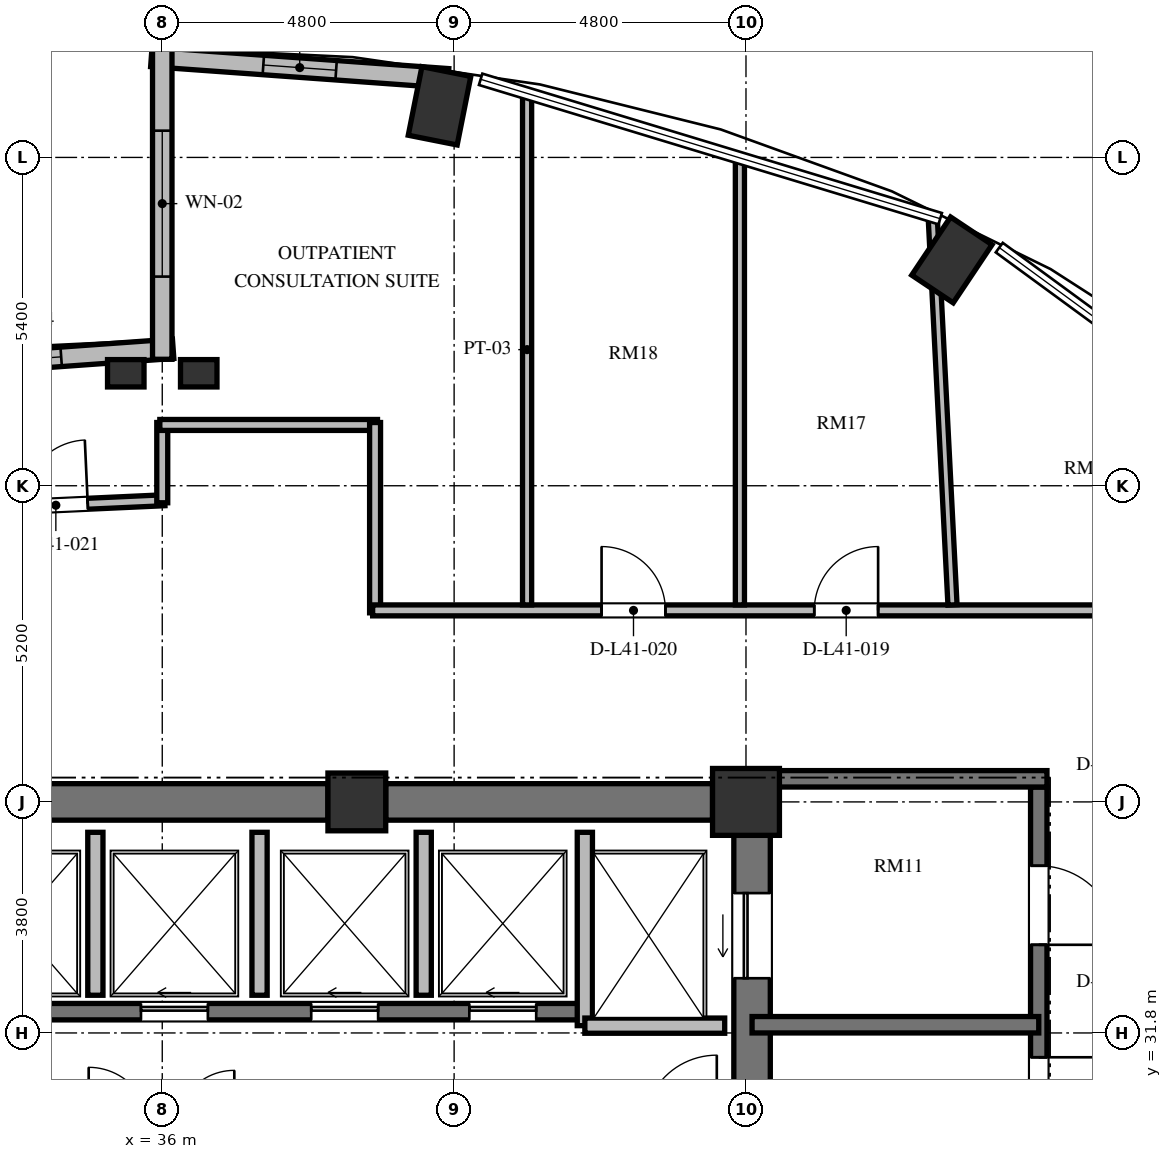
"""IFC4 building model, lengths in metres.
Left out: names, types, materials, properties, quantities, classifications, styles, units other than length and angle.
Written with IfcOpenShell. Run it as: python <this file> out.ifc"""

import sys

from ifc_helpers import new_model, si_unit, direction, frame, frame_2d, origin, origin_2d, place, context, subcontext, project, spatial, rectangle, extrude, element, fill, save


model = new_model("IFC4")
c1 = context("Model", 3, precision=1e-05, world=origin(), true_north=direction((0.0, 1.0)))
c2 = subcontext(c1, "Body", "Model", "MODEL_VIEW")
j1 = project(units=[si_unit("LENGTHUNIT", "METRE"), si_unit("PLANEANGLEUNIT", "RADIAN")], contexts=[c1])
p1 = place(None, origin())
s1 = spatial("IfcSite", under=j1, at=p1, CompositionType="ELEMENT")
p2 = place(p1, origin())
s2 = spatial("IfcBuilding", under=s1, at=p2, CompositionType="ELEMENT")
p3 = place(p2, frame((0.0, 0.0, 160.176)))
s3 = spatial("IfcBuildingStorey", under=s2, at=p3, CompositionType="ELEMENT", Elevation=160.176)
for number, where, z_axis, x_axis in (
    (1, (48.987, 44.514, 0.0), (0.0, 0.0, 1.0), (0.556, 0.831, 0.0)),
    (2, (40.56, 47.049, 0.0), (0.0, 0.0, 1.0), (0.195, 0.981, 0.0)),
):
    element("IfcColumn", number, at=place(p3, frame(where, z_axis=z_axis, x_axis=x_axis)), inside=s3, PredefinedType="COLUMN", context=c2, shape_type="SweptSolid", body=[
        extrude(rectangle(XDim=1.15, YDim=0.82, at=origin_2d()), origin(), (0.0, 0.0, 1.0), 3.648),
    ])
p4 = place(p3, frame((45.6, 35.6, 0.0), z_axis=(0.0, 0.0, 1.0), x_axis=(1.0, 0.0, 0.0)))
e3 = element("IfcColumn", 3, at=p4, inside=s3, PredefinedType="COLUMN", context=c2, shape_type="SweptSolid", body=[
    extrude(rectangle(XDim=1.1, YDim=1.1, at=origin_2d()), origin(), (0.0, 0.0, 1.0), 3.648),
])
p5 = place(p3, frame((39.2, 35.6, 0.0), z_axis=(0.0, 0.0, 1.0), x_axis=(1.0, 0.0, 0.0)))
e4 = element("IfcColumn", 4, at=p5, inside=s3, PredefinedType="COLUMN", context=c2, shape_type="SweptSolid", body=[
    extrude(rectangle(XDim=0.95, YDim=0.95, at=origin_2d()), origin(), (0.0, 0.0, 1.0), 3.648),
])
for number, where, z_axis, x_axis in (
    (5, (35.4, 42.65, 0.0), (0.0, 0.0, 1.0), (1.0, 0.0, 0.0)),
    (6, (36.6, 42.65, 0.0), (0.0, 0.0, 1.0), (1.0, 0.0, 0.0)),
):
    element("IfcColumn", number, at=place(p3, frame(where, z_axis=z_axis, x_axis=x_axis)), inside=s3, PredefinedType="PILASTER", context=c2, shape_type="SweptSolid", body=[
        extrude(rectangle(XDim=0.6, YDim=0.45, at=origin_2d()), origin(), (0.0, 0.0, 1.0), 3.648),
    ])
p6 = place(p3, frame((45.7, 20.95, 0.0), z_axis=(0.0, 0.0, 1.0), x_axis=(0.0, 1.0, 0.0)))
e7 = element("IfcWall", 7, at=p6, inside=s3, PredefinedType="SHEAR", context=c2, shape_type="SweptSolid", body=[
    extrude(rectangle(XDim=14.1, YDim=0.6, at=frame_2d((7.05, 0.0))), origin(), (0.0, 0.0, 1.0), 3.648),
])
p7 = place(p6, frame((11.75, 0.0, 0.0)))
e8 = element("IfcOpeningElement", 8, at=p7, cuts=e7, PredefinedType="OPENING", context=c2, shape_type="SweptSolid", body=[
    extrude(rectangle(XDim=1.4, YDim=2.3, at=frame_2d((0.7, 1.15))), frame((0.0, 0.31, 0.0), z_axis=(0.0, -1.0, 0.0), x_axis=(1.0, 0.0, 0.0)), (0.0, 0.0, 1.0), 0.62),
])
p8 = place(p6, frame((0.95, 0.0, 0.0)))
e9 = element("IfcOpeningElement", 9, at=p8, cuts=e7, PredefinedType="OPENING", context=c2, shape_type="SweptSolid", body=[
    extrude(rectangle(XDim=1.4, YDim=2.3, at=frame_2d((0.7, 1.15))), frame((0.0, 0.31, 0.0), z_axis=(0.0, -1.0, 0.0), x_axis=(1.0, 0.0, 0.0)), (0.0, 0.0, 1.0), 0.62),
])
p9 = place(p3, frame((33.275, 35.6, 0.0), z_axis=(0.0, 0.0, 1.0), x_axis=(1.0, 0.0, 0.0)))
e10 = element("IfcWall", 10, at=p9, inside=s3, PredefinedType="SHEAR", context=c2, shape_type="SweptSolid", body=[
    extrude(rectangle(XDim=5.45, YDim=0.6, at=frame_2d((2.725, 0.0))), origin(), (0.0, 0.0, 1.0), 3.648),
])
p10 = place(p3, frame((39.675, 35.6, 0.0), z_axis=(0.0, 0.0, 1.0), x_axis=(1.0, 0.0, 0.0)))
e11 = element("IfcWall", 11, at=p10, inside=s3, PredefinedType="SHEAR", context=c2, shape_type="SweptSolid", body=[
    extrude(rectangle(XDim=5.375, YDim=0.6, at=frame_2d((2.688, 0.0))), origin(), (0.0, 0.0, 1.0), 3.648),
])
p11 = place(p3, frame((40.701, 47.501, 0.0), z_axis=(0.0, 0.0, 1.0), x_axis=(-0.997415460462, 0.071849838072, 0.0)))
e12 = element("IfcWall", 12, at=p11, inside=s3, PredefinedType="SOLIDWALL", context=c2, shape_type="SweptSolid", body=[
    extrude(rectangle(XDim=4.893, YDim=0.32, at=frame_2d((2.447, 0.0))), origin(), (0.0, 0.0, 1.0), 3.428),
])
p12 = place(p11, frame((1.846, 0.0, 0.85)))
e13 = element("IfcOpeningElement", 13, at=p12, cuts=e12, PredefinedType="OPENING", context=c2, shape_type="SweptSolid", body=[
    extrude(rectangle(XDim=1.2, YDim=2.2, at=frame_2d((0.6, 1.1))), frame((0.0, 0.17, 0.0), z_axis=(0.0, -1.0, 0.0), x_axis=(1.0, 0.0, 0.0)), (0.0, 0.0, 1.0), 0.34),
])
p13 = place(p3, frame((36.179, 43.053, 0.0), z_axis=(0.0, 0.0, 1.0), x_axis=(-0.997415202861, -0.071853413984, 0.0)))
e14 = element("IfcWall", 14, at=p13, inside=s3, PredefinedType="SOLIDWALL", context=c2, shape_type="SweptSolid", body=[
    extrude(rectangle(XDim=4.893, YDim=0.32, at=frame_2d((2.446, 0.0))), origin(), (0.0, 0.0, 1.0), 3.428),
])
p14 = place(p13, frame((1.846, 0.0, 0.85)))
e15 = element("IfcOpeningElement", 15, at=p14, cuts=e14, PredefinedType="OPENING", context=c2, shape_type="SweptSolid", body=[
    extrude(rectangle(XDim=1.2, YDim=1.8, at=frame_2d((0.6, 0.9))), frame((0.0, 0.17, 0.0), z_axis=(0.0, -1.0, 0.0), x_axis=(1.0, 0.0, 0.0)), (0.0, 0.0, 1.0), 0.34),
])
p15 = place(p3, frame((36.0, 48.0, 0.0), z_axis=(0.0, 0.0, 1.0), x_axis=(0.0, -1.0, 0.0)))
e16 = element("IfcWall", 16, at=p15, inside=s3, PredefinedType="SOLIDWALL", context=c2, shape_type="SweptSolid", body=[
    extrude(rectangle(XDim=5.12, YDim=0.32, at=frame_2d((2.56, 0.0))), origin(), (0.0, 0.0, 1.0), 3.428),
])
p16 = place(p15, frame((1.36, 0.0, 0.84)))
e17 = element("IfcOpeningElement", 17, at=p16, cuts=e16, PredefinedType="OPENING", context=c2, shape_type="SweptSolid", body=[
    extrude(rectangle(XDim=2.4, YDim=2.04, at=frame_2d((1.2, 1.02))), frame((0.0, 0.17, 0.0), z_axis=(0.0, -1.0, 0.0), x_axis=(1.0, 0.0, 0.0)), (0.0, 0.0, 1.0), 0.34),
])
p17 = place(p3, frame((26.55, 32.15, 0.0), z_axis=(0.0, 0.0, 1.0), x_axis=(1.0, 0.0, 0.0)))
e18 = element("IfcWall", 18, at=p17, inside=s3, PredefinedType="SHEAR", context=c2, shape_type="SweptSolid", body=[
    extrude(rectangle(XDim=16.4, YDim=0.27, at=frame_2d((8.2, 0.0))), origin(), (0.0, 0.0, 1.0), 3.648),
])
p18 = place(p17, frame((1.525, 0.0, 0.0)))
e19 = element("IfcOpeningElement", 19, at=p18, cuts=e18, PredefinedType="OPENING", context=c2, shape_type="SweptSolid", body=[
    extrude(rectangle(XDim=1.05, YDim=2.15, at=frame_2d((0.525, 1.075))), frame((0.0, 0.145, 0.0), z_axis=(0.0, -1.0, 0.0), x_axis=(1.0, 0.0, 0.0)), (0.0, 0.0, 1.0), 0.29),
])
p19 = place(p17, frame((4.275, 0.0, 0.0)))
e20 = element("IfcOpeningElement", 20, at=p19, cuts=e18, PredefinedType="OPENING", context=c2, shape_type="SweptSolid", body=[
    extrude(rectangle(XDim=0.95, YDim=2.1, at=frame_2d((0.475, 1.05))), frame((0.0, 0.145, 0.0), z_axis=(0.0, -1.0, 0.0), x_axis=(1.0, 0.0, 0.0)), (0.0, 0.0, 1.0), 0.29),
])
p20 = place(p17, frame((6.5, 0.0, 0.0)))
e21 = element("IfcOpeningElement", 21, at=p20, cuts=e18, PredefinedType="OPENING", context=c2, shape_type="SweptSolid", body=[
    extrude(rectangle(XDim=1.1, YDim=2.2, at=frame_2d((0.55, 1.1))), frame((0.0, 0.145, 0.0), z_axis=(0.0, -1.0, 0.0), x_axis=(1.0, 0.0, 0.0)), (0.0, 0.0, 1.0), 0.29),
])
p21 = place(p17, frame((9.1, 0.0, 0.0)))
e22 = element("IfcOpeningElement", 22, at=p21, cuts=e18, PredefinedType="OPENING", context=c2, shape_type="SweptSolid", body=[
    extrude(rectangle(XDim=1.1, YDim=2.2, at=frame_2d((0.55, 1.1))), frame((0.0, 0.145, 0.0), z_axis=(0.0, -1.0, 0.0), x_axis=(1.0, 0.0, 0.0)), (0.0, 0.0, 1.0), 0.29),
])
p22 = place(p17, frame((11.9, 0.0, 0.0)))
e23 = element("IfcOpeningElement", 23, at=p22, cuts=e18, PredefinedType="OPENING", context=c2, shape_type="SweptSolid", body=[
    extrude(rectangle(XDim=1.1, YDim=2.2, at=frame_2d((0.55, 1.1))), frame((0.0, 0.145, 0.0), z_axis=(0.0, -1.0, 0.0), x_axis=(1.0, 0.0, 0.0)), (0.0, 0.0, 1.0), 0.29),
])
p23 = place(p17, frame((14.5, 0.0, 0.0)))
e24 = element("IfcOpeningElement", 24, at=p23, cuts=e18, PredefinedType="OPENING", context=c2, shape_type="SweptSolid", body=[
    extrude(rectangle(XDim=1.1, YDim=2.2, at=frame_2d((0.55, 1.1))), frame((0.0, 0.145, 0.0), z_axis=(0.0, -1.0, 0.0), x_axis=(1.0, 0.0, 0.0)), (0.0, 0.0, 1.0), 0.29),
])
p24 = place(p3, frame((42.95, 31.92, 0.0), z_axis=(0.0, 0.0, 1.0), x_axis=(0.0, 1.0, 0.0)))
e25 = element("IfcWall", 25, at=p24, inside=s3, PredefinedType="SOLIDWALL", context=c2, shape_type="SweptSolid", body=[
    extrude(rectangle(XDim=3.18, YDim=0.25, at=frame_2d((1.59, 0.0))), origin(), (0.0, 0.0, 1.0), 3.428),
])
p25 = place(p3, frame((42.95, 31.92, 0.0), z_axis=(0.0, 0.0, 1.0), x_axis=(1.0, 0.0, 0.0)))
e26 = element("IfcWall", 26, at=p25, inside=s3, PredefinedType="SOLIDWALL", context=c2, shape_type="SweptSolid", body=[
    extrude(rectangle(XDim=2.3, YDim=0.25, at=frame_2d((1.15, 0.0))), origin(), (0.0, 0.0, 1.0), 3.428),
])
for number, where, z_axis, x_axis in (
    (27, (34.9, 32.42, 0.0), (0.0, 0.0, 1.0), (0.0, 1.0, 0.0)),
    (28, (37.6, 32.42, 0.0), (0.0, 0.0, 1.0), (0.0, 1.0, 0.0)),
    (29, (40.3, 32.42, 0.0), (0.0, 0.0, 1.0), (0.0, 1.0, 0.0)),
):
    element("IfcWall", number, at=place(p3, frame(where, z_axis=z_axis, x_axis=x_axis)), inside=s3, PredefinedType="SOLIDWALL", context=c2, shape_type="SweptSolid", body=[
        extrude(rectangle(XDim=2.68, YDim=0.25, at=frame_2d((1.34, 0.0))), origin(), (0.0, 0.0, 1.0), 3.428),
    ])
p26 = place(p3, frame((50.415, 35.845, 0.0), z_axis=(0.0, 0.0, 1.0), x_axis=(0.0, -1.0, 0.0)))
e30 = element("IfcWall", 30, at=p26, inside=s3, PredefinedType="SHEAR", context=c2, shape_type="SweptSolid", body=[
    extrude(rectangle(XDim=15.825, YDim=0.27, at=frame_2d((7.913, 0.0))), origin(), (0.0, 0.0, 1.0), 3.648),
])
p27 = place(p26, frame((4.445, 0.0, 0.0)))
e31 = element("IfcOpeningElement", 31, at=p27, cuts=e30, PredefinedType="OPENING", context=c2, shape_type="SweptSolid", body=[
    extrude(rectangle(XDim=1.2, YDim=2.15, at=frame_2d((0.6, 1.075))), frame((0.0, 0.145, 0.0), z_axis=(0.0, -1.0, 0.0), x_axis=(1.0, 0.0, 0.0)), (0.0, 0.0, 1.0), 0.29),
])
p28 = place(p26, frame((1.295, 0.0, 0.0)))
e32 = element("IfcOpeningElement", 32, at=p28, cuts=e30, PredefinedType="OPENING", context=c2, shape_type="SweptSolid", body=[
    extrude(rectangle(XDim=1.3, YDim=2.2, at=frame_2d((0.65, 1.1))), frame((0.0, 0.145, 0.0), z_axis=(0.0, -1.0, 0.0), x_axis=(1.0, 0.0, 0.0)), (0.0, 0.0, 1.0), 0.29),
])
p29 = place(p26, frame((13.095, 0.0, 0.0)))
e33 = element("IfcOpeningElement", 33, at=p29, cuts=e30, PredefinedType="OPENING", context=c2, shape_type="SweptSolid", body=[
    extrude(rectangle(XDim=1.3, YDim=2.2, at=frame_2d((0.65, 1.1))), frame((0.0, 0.145, 0.0), z_axis=(0.0, -1.0, 0.0), x_axis=(1.0, 0.0, 0.0)), (0.0, 0.0, 1.0), 0.29),
])
p30 = place(p3, frame((46.0, 35.98, 0.0), z_axis=(0.0, 0.0, 1.0), x_axis=(1.0, 0.0, 0.0)))
e34 = element("IfcWall", 34, at=p30, inside=s3, PredefinedType="SHEAR", context=c2, shape_type="SweptSolid", body=[
    extrude(rectangle(XDim=4.55, YDim=0.27, at=frame_2d((2.275, 0.0))), origin(), (0.0, 0.0, 1.0), 3.648),
])
p31 = place(p3, frame((45.7, 31.935, 0.0), z_axis=(0.0, 0.0, 1.0), x_axis=(1.0, 0.0, 0.0)))
e35 = element("IfcWall", 35, at=p31, inside=s3, PredefinedType="SHEAR", context=c2, shape_type="SweptSolid", body=[
    extrude(rectangle(XDim=4.715, YDim=0.27, at=frame_2d((2.357, 0.0))), origin(), (0.0, 0.0, 1.0), 3.648),
])
p32 = place(p3, frame((32.46, 40.397, 0.0), z_axis=(0.0, 0.0, 1.0), x_axis=(0.998948498694, 0.045846449783, 0.0)))
e36 = element("IfcWall", 36, at=p32, inside=s3, PredefinedType="PARTITIONING", context=c2, shape_type="SweptSolid", body=[
    extrude(rectangle(XDim=3.584, YDim=0.18, at=frame_2d((1.792, 0.0))), origin(), (0.0, 0.0, 1.0), 3.428),
])
p33 = place(p32, frame((1.267, 0.0, 0.0)))
e37 = element("IfcOpeningElement", 37, at=p33, cuts=e36, PredefinedType="OPENING", context=c2, shape_type="SweptSolid", body=[
    extrude(rectangle(XDim=1.05, YDim=2.15, at=frame_2d((0.525, 1.075))), frame((0.0, 0.1, 0.0), z_axis=(0.0, -1.0, 0.0), x_axis=(1.0, 0.0, 0.0)), (0.0, 0.0, 1.0), 0.2),
])
p34 = place(p3, frame((36.0, 40.52, 0.0), z_axis=(0.0, 0.0, 1.0), x_axis=(0.0, 1.0, 0.0)))
e38 = element("IfcWall", 38, at=p34, inside=s3, PredefinedType="PARTITIONING", context=c2, shape_type="SweptSolid", body=[
    extrude(rectangle(XDim=1.32, YDim=0.18, at=frame_2d((0.66, 0.0))), origin(), (0.0, 0.0, 1.0), 3.428),
])
p35 = place(p3, frame((35.96, 41.8, 0.0), z_axis=(0.0, 0.0, 1.0), x_axis=(1.0, 0.0, 0.0)))
e39 = element("IfcWall", 39, at=p35, inside=s3, PredefinedType="PARTITIONING", context=c2, shape_type="SweptSolid", body=[
    extrude(rectangle(XDim=3.58, YDim=0.18, at=frame_2d((1.79, 0.0))), origin(), (0.0, 0.0, 1.0), 3.428),
])
p36 = place(p3, frame((39.5, 41.84, 0.0), z_axis=(0.0, 0.0, 1.0), x_axis=(0.0, -1.0, 0.0)))
e40 = element("IfcWall", 40, at=p36, inside=s3, PredefinedType="PARTITIONING", context=c2, shape_type="SweptSolid", body=[
    extrude(rectangle(XDim=3.13, YDim=0.18, at=frame_2d((1.565, 0.0))), origin(), (0.0, 0.0, 1.0), 2.863),
])
p37 = place(p3, frame((39.46, 38.75, 0.0), z_axis=(0.0, 0.0, 1.0), x_axis=(1.0, 0.0, 0.0)))
e41 = element("IfcWall", 41, at=p37, inside=s3, PredefinedType="PARTITIONING", context=c2, shape_type="SweptSolid", body=[
    extrude(rectangle(XDim=13.73, YDim=0.18, at=frame_2d((6.865, 0.0))), origin(), (0.0, 0.0, 1.0), 3.428),
])
p38 = place(p37, frame((7.263, 0.0, 0.0)))
e42 = element("IfcOpeningElement", 42, at=p38, cuts=e41, PredefinedType="OPENING", context=c2, shape_type="SweptSolid", body=[
    extrude(rectangle(XDim=1.05, YDim=2.15, at=frame_2d((0.525, 1.075))), frame((0.0, 0.1, 0.0), z_axis=(0.0, -1.0, 0.0), x_axis=(1.0, 0.0, 0.0)), (0.0, 0.0, 1.0), 0.2),
])
p39 = place(p37, frame((3.765, 0.0, 0.0)))
e43 = element("IfcOpeningElement", 43, at=p39, cuts=e41, PredefinedType="OPENING", context=c2, shape_type="SweptSolid", body=[
    extrude(rectangle(XDim=1.05, YDim=2.15, at=frame_2d((0.525, 1.075))), frame((0.0, 0.1, 0.0), z_axis=(0.0, -1.0, 0.0), x_axis=(1.0, 0.0, 0.0)), (0.0, 0.0, 1.0), 0.2),
])
p40 = place(p3, frame((42.0, 38.84, 0.0), z_axis=(0.0, 0.0, 1.0), x_axis=(0.0, 1.0, 0.0)))
e44 = element("IfcWall", 44, at=p40, inside=s3, PredefinedType="PARTITIONING", context=c2, shape_type="SweptSolid", body=[
    extrude(rectangle(XDim=8.398, YDim=0.15, at=frame_2d((4.199, 0.0))), origin(), (0.0, 0.0, 1.0), 3.428),
])
p41 = place(p3, frame((45.5, 38.84, 0.0), z_axis=(0.0, 0.0, 1.0), x_axis=(0.0, 1.0, 0.0)))
e45 = element("IfcWall", 45, at=p41, inside=s3, PredefinedType="PARTITIONING", context=c2, shape_type="SweptSolid", body=[
    extrude(rectangle(XDim=7.336, YDim=0.15, at=frame_2d((3.668, 0.0))), origin(), (0.0, 0.0, 1.0), 3.428),
])
p42 = place(p3, frame((48.996, 38.84, 0.0), z_axis=(0.0, 0.0, 1.0), x_axis=(-0.050906361105, 0.998703430653, 0.0)))
e46 = element("IfcWall", 46, at=p42, inside=s3, PredefinedType="PARTITIONING", context=c2, shape_type="SweptSolid", body=[
    extrude(rectangle(XDim=6.398, YDim=0.15, at=frame_2d((3.199, 0.0))), origin(), (0.0, 0.0, 1.0), 3.428),
])
p43 = place(p12, origin())
e47 = element("IfcWindow", 47, at=p43, inside=s3, PartitioningType="SINGLE_PANEL", PredefinedType="WINDOW", context=c2, shape_type="SweptSolid", body=[
    extrude(rectangle(XDim=1.2, YDim=2.2, at=frame_2d((0.6, 1.1))), frame((0.0, 0.03, 0.0), z_axis=(0.0, -1.0, 0.0), x_axis=(1.0, 0.0, 0.0)), (0.0, 0.0, 1.0), 0.06),
])
fill(e13, e47)
p44 = place(p14, origin())
e48 = element("IfcWindow", 48, at=p44, inside=s3, PartitioningType="SINGLE_PANEL", PredefinedType="WINDOW", context=c2, shape_type="SweptSolid", body=[
    extrude(rectangle(XDim=1.2, YDim=1.8, at=frame_2d((0.6, 0.9))), frame((0.0, 0.03, 0.0), z_axis=(0.0, -1.0, 0.0), x_axis=(1.0, 0.0, 0.0)), (0.0, 0.0, 1.0), 0.06),
])
fill(e15, e48)
p45 = place(p16, origin())
e49 = element("IfcWindow", 49, at=p45, inside=s3, PartitioningType="SINGLE_PANEL", PredefinedType="WINDOW", context=c2, shape_type="SweptSolid", body=[
    extrude(rectangle(XDim=2.4, YDim=2.04, at=frame_2d((1.2, 1.02))), frame((0.0, 0.03, 0.0), z_axis=(0.0, -1.0, 0.0), x_axis=(1.0, 0.0, 0.0)), (0.0, 0.0, 1.0), 0.06),
])
fill(e17, e49)
p46 = place(p21, origin())
e50 = element("IfcDoor", 50, at=p46, inside=s3, OperationType="SLIDING_TO_LEFT", PredefinedType="DOOR", context=c2, shape_type="SweptSolid", body=[
    extrude(rectangle(XDim=1.1, YDim=2.2, at=frame_2d((0.55, 1.1))), frame((0.0, 0.025, 0.0), z_axis=(0.0, -1.0, 0.0), x_axis=(1.0, 0.0, 0.0)), (0.0, 0.0, 1.0), 0.05),
])
fill(e22, e50)
p47 = place(p22, origin())
e51 = element("IfcDoor", 51, at=p47, inside=s3, OperationType="SLIDING_TO_LEFT", PredefinedType="DOOR", context=c2, shape_type="SweptSolid", body=[
    extrude(rectangle(XDim=1.1, YDim=2.2, at=frame_2d((0.55, 1.1))), frame((0.0, 0.025, 0.0), z_axis=(0.0, -1.0, 0.0), x_axis=(1.0, 0.0, 0.0)), (0.0, 0.0, 1.0), 0.05),
])
fill(e23, e51)
p48 = place(p23, origin())
e52 = element("IfcDoor", 52, at=p48, inside=s3, OperationType="SLIDING_TO_LEFT", PredefinedType="DOOR", context=c2, shape_type="SweptSolid", body=[
    extrude(rectangle(XDim=1.1, YDim=2.2, at=frame_2d((0.55, 1.1))), frame((0.0, 0.025, 0.0), z_axis=(0.0, -1.0, 0.0), x_axis=(1.0, 0.0, 0.0)), (0.0, 0.0, 1.0), 0.05),
])
fill(e24, e52)
p49 = place(p7, origin())
e53 = element("IfcDoor", 53, at=p49, inside=s3, OperationType="SLIDING_TO_LEFT", PredefinedType="DOOR", context=c2, shape_type="SweptSolid", body=[
    extrude(rectangle(XDim=1.4, YDim=2.3, at=frame_2d((0.7, 1.15))), frame((0.0, 0.025, 0.0), z_axis=(0.0, -1.0, 0.0), x_axis=(1.0, 0.0, 0.0)), (0.0, 0.0, 1.0), 0.05),
])
fill(e8, e53)
p50 = place(p27, origin())
e54 = element("IfcDoor", 54, at=p50, inside=s3, OperationType="SINGLE_SWING_LEFT", PredefinedType="DOOR", context=c2, shape_type="SweptSolid", body=[
    extrude(rectangle(XDim=1.2, YDim=2.15, at=frame_2d((0.6, 1.075))), frame((0.0, 0.025, 0.0), z_axis=(0.0, -1.0, 0.0), x_axis=(1.0, 0.0, 0.0)), (0.0, 0.0, 1.0), 0.05),
])
fill(e31, e54)
p51 = place(p28, origin())
e55 = element("IfcDoor", 55, at=p51, inside=s3, OperationType="SINGLE_SWING_RIGHT", PredefinedType="DOOR", context=c2, shape_type="SweptSolid", body=[
    extrude(rectangle(XDim=1.3, YDim=2.2, at=frame_2d((0.65, 1.1))), frame((0.0, 0.025, 0.0), z_axis=(0.0, -1.0, 0.0), x_axis=(1.0, 0.0, 0.0)), (0.0, 0.0, 1.0), 0.05),
])
fill(e32, e55)
p52 = place(p38, origin())
e56 = element("IfcDoor", 56, at=p52, inside=s3, OperationType="SINGLE_SWING_RIGHT", PredefinedType="DOOR", context=c2, shape_type="SweptSolid", body=[
    extrude(rectangle(XDim=1.05, YDim=2.15, at=frame_2d((0.525, 1.075))), frame((0.0, 0.025, 0.0), z_axis=(0.0, -1.0, 0.0), x_axis=(1.0, 0.0, 0.0)), (0.0, 0.0, 1.0), 0.05),
])
fill(e42, e56)
p53 = place(p39, origin())
e57 = element("IfcDoor", 57, at=p53, inside=s3, OperationType="SINGLE_SWING_LEFT", PredefinedType="DOOR", context=c2, shape_type="SweptSolid", body=[
    extrude(rectangle(XDim=1.05, YDim=2.15, at=frame_2d((0.525, 1.075))), frame((0.0, 0.025, 0.0), z_axis=(0.0, -1.0, 0.0), x_axis=(1.0, 0.0, 0.0)), (0.0, 0.0, 1.0), 0.05),
])
fill(e43, e57)
p54 = place(p33, origin())
e58 = element("IfcDoor", 58, at=p54, inside=s3, OperationType="SINGLE_SWING_RIGHT", PredefinedType="DOOR", context=c2, shape_type="SweptSolid", body=[
    extrude(rectangle(XDim=1.05, YDim=2.15, at=frame_2d((0.525, 1.075))), frame((0.0, 0.025, 0.0), z_axis=(0.0, -1.0, 0.0), x_axis=(1.0, 0.0, 0.0)), (0.0, 0.0, 1.0), 0.05),
])
fill(e37, e58)
save(model, sys.argv[1])
